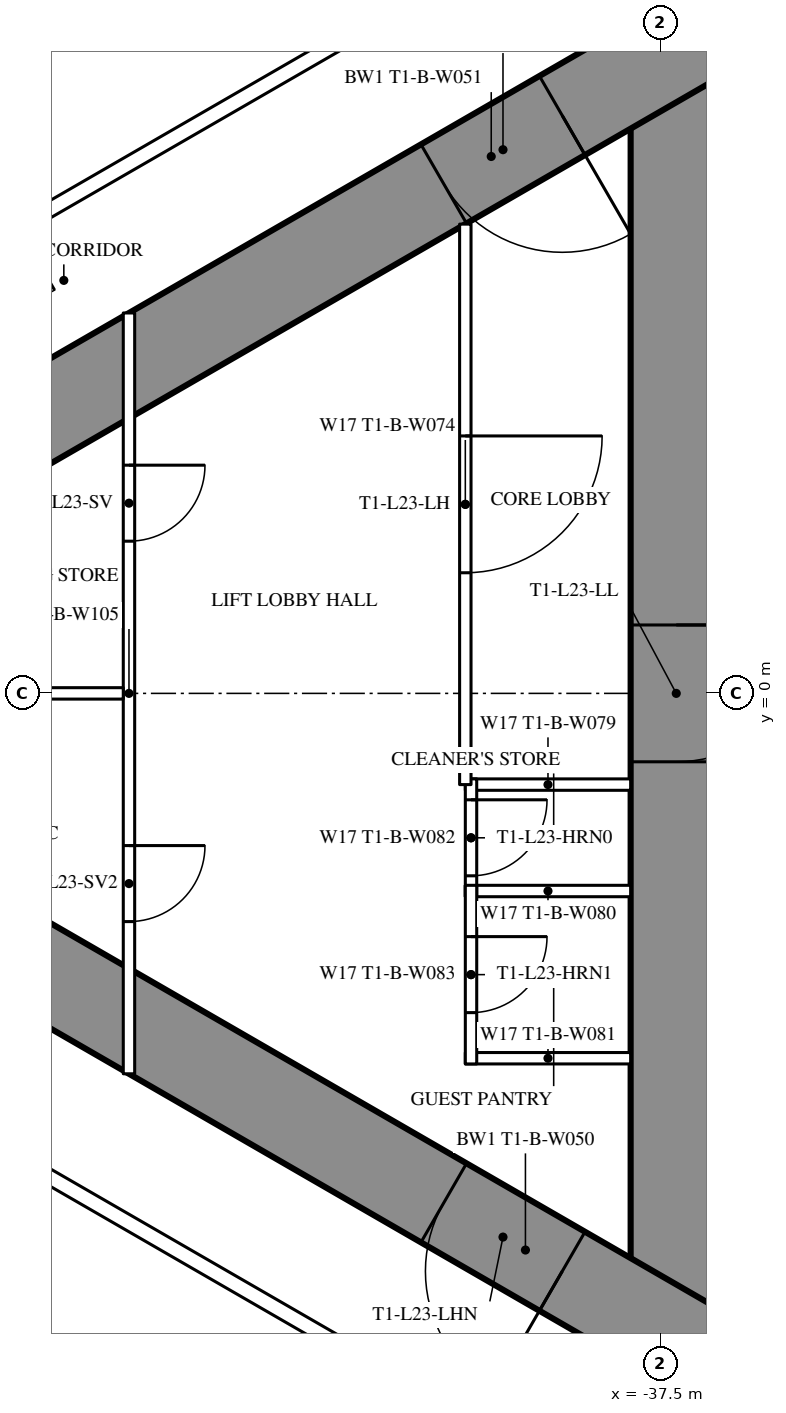
"""IFC4 building model, lengths in metres.
Left out: names, types, materials, properties, quantities, classifications, styles, units other than length and angle.
Written with IfcOpenShell. Run it as: python <this file> out.ifc"""

import sys

from ifc_helpers import new_model, si_unit, direction, frame, frame_2d, origin, place, context, subcontext, project, spatial, rectangle, extrude, element, fill, save


model = new_model("IFC4")
c1 = context("Model", 3, precision=1e-05, world=origin(), true_north=direction((0.0, 1.0)))
c2 = subcontext(c1, "Body", "Model", "MODEL_VIEW")
j1 = project(units=[si_unit("LENGTHUNIT", "METRE"), si_unit("PLANEANGLEUNIT", "RADIAN")], contexts=[c1])
p1 = place(None, origin())
s1 = spatial("IfcSite", under=j1, at=p1, CompositionType="ELEMENT")
p2 = place(p1, origin())
s2 = spatial("IfcBuilding", under=s1, at=p2, CompositionType="ELEMENT")
p3 = place(p2, frame((0.0, 0.0, 90.6)))
s3 = spatial("IfcBuildingStorey", under=s2, at=p3, CompositionType="ELEMENT", Elevation=90.6)
p4 = place(p3, frame((-37.3, 8.6, 0.0), z_axis=(0.0, 0.0, 1.0), x_axis=(0.0, -1.0, 0.0)))
e1 = element("IfcWall", 1, at=p4, inside=s3, PredefinedType="SHEAR", context=c2, shape_type="SweptSolid", body=[
    extrude(rectangle(XDim=17.2, YDim=1.2, at=frame_2d((8.6, 0.0))), origin(), (0.0, 0.0, 1.0), 3.5),
])
p5 = place(p4, frame((7.7, 0.0, 0.0)))
e2 = element("IfcOpeningElement", 2, at=p5, cuts=e1, PredefinedType="OPENING", context=c2, shape_type="SweptSolid", body=[
    extrude(rectangle(XDim=1.8, YDim=2.2, at=frame_2d((0.9, 1.1))), frame((0.0, 0.61, 0.0), z_axis=(0.0, -1.0, 0.0), x_axis=(1.0, 0.0, 0.0)), (0.0, 0.0, 1.0), 1.22),
])
p6 = place(p3, frame((-27.2, 14.3, 0.0), z_axis=(0.0, 0.0, 1.0), x_axis=(-0.866026593062, -0.499997940104, 0.0)))
e3 = element("IfcWall", 3, at=p6, inside=s3, PredefinedType="SHEAR", context=c2, shape_type="SweptSolid", body=[
    extrude(rectangle(XDim=28.946, YDim=1.2, at=frame_2d((14.473, 0.0))), origin(), (0.0, 0.0, 1.0), 3.5),
])
p7 = place(p6, frame((4.6, 0.0, 0.0)))
e4 = element("IfcOpeningElement", 4, at=p7, cuts=e3, PredefinedType="OPENING", context=c2, shape_type="SweptSolid", body=[
    extrude(rectangle(XDim=1.0, YDim=2.2, at=frame_2d((0.5, 1.1))), frame((0.0, 0.61, 0.0), z_axis=(0.0, -1.0, 0.0), x_axis=(1.0, 0.0, 0.0)), (0.0, 0.0, 1.0), 1.22),
])
p8 = place(p6, frame((13.395, 0.0, 0.0)))
e5 = element("IfcOpeningElement", 5, at=p8, cuts=e3, PredefinedType="OPENING", context=c2, shape_type="SweptSolid", body=[
    extrude(rectangle(XDim=1.8, YDim=2.2, at=frame_2d((0.9, 1.1))), frame((0.0, 0.61, 0.0), z_axis=(0.0, -1.0, 0.0), x_axis=(1.0, 0.0, 0.0)), (0.0, 0.0, 1.0), 1.22),
])
p9 = place(p3, frame((-27.2, -14.3, 0.0), z_axis=(0.0, 0.0, 1.0), x_axis=(-0.866024021859, 0.500002393557, 0.0)))
e6 = element("IfcWall", 6, at=p9, inside=s3, PredefinedType="SHEAR", context=c2, shape_type="SweptSolid", body=[
    extrude(rectangle(XDim=27.907, YDim=1.2, at=frame_2d((13.954, 0.0))), origin(), (0.0, 0.0, 1.0), 3.5),
])
p10 = place(p9, frame((4.6, 0.0, 0.0)))
e7 = element("IfcOpeningElement", 7, at=p10, cuts=e6, PredefinedType="OPENING", context=c2, shape_type="SweptSolid", body=[
    extrude(rectangle(XDim=1.0, YDim=2.2, at=frame_2d((0.5, 1.1))), frame((0.0, 0.61, 0.0), z_axis=(0.0, -1.0, 0.0), x_axis=(1.0, 0.0, 0.0)), (0.0, 0.0, 1.0), 1.22),
])
p11 = place(p9, frame((13.395, 0.0, 0.0)))
e8 = element("IfcOpeningElement", 8, at=p11, cuts=e6, PredefinedType="OPENING", context=c2, shape_type="SweptSolid", body=[
    extrude(rectangle(XDim=1.8, YDim=2.2, at=frame_2d((0.9, 1.1))), frame((0.0, 0.61, 0.0), z_axis=(0.0, -1.0, 0.0), x_axis=(1.0, 0.0, 0.0)), (0.0, 0.0, 1.0), 1.22),
])
p12 = place(p3, frame((-37.7, 10.894, 0.0), z_axis=(0.0, 0.0, 1.0), x_axis=(-0.866027905338, -0.499995667157, 0.0)))
e9 = element("IfcWall", 9, at=p12, inside=s3, PredefinedType="PARTITIONING", context=c2, shape_type="SweptSolid", body=[
    extrude(rectangle(XDim=21.787, YDim=0.2, at=frame_2d((10.894, 0.0))), origin(), (0.0, 0.0, 1.0), 3.25),
])
p13 = place(p12, frame((17.887, 0.0, 0.0)))
e10 = element("IfcOpeningElement", 10, at=p13, cuts=e9, PredefinedType="OPENING", context=c2, shape_type="SweptSolid", body=[
    extrude(rectangle(XDim=0.95, YDim=2.2, at=frame_2d((0.475, 1.1))), frame((0.0, 0.11, 0.0), z_axis=(0.0, -1.0, 0.0), x_axis=(1.0, 0.0, 0.0)), (0.0, 0.0, 1.0), 0.22),
])
p14 = place(p12, frame((9.531, 0.0, 0.0)))
e11 = element("IfcOpeningElement", 11, at=p14, cuts=e9, PredefinedType="OPENING", context=c2, shape_type="SweptSolid", body=[
    extrude(rectangle(XDim=0.95, YDim=2.2, at=frame_2d((0.475, 1.1))), frame((0.0, 0.11, 0.0), z_axis=(0.0, -1.0, 0.0), x_axis=(1.0, 0.0, 0.0)), (0.0, 0.0, 1.0), 0.22),
])
p15 = place(p3, frame((-36.92, -11.344, 0.0), z_axis=(0.0, 0.0, 1.0), x_axis=(-0.866028313256, 0.499994960614, 0.0)))
e12 = element("IfcWall", 12, at=p15, inside=s3, PredefinedType="PARTITIONING", context=c2, shape_type="SweptSolid", body=[
    extrude(rectangle(XDim=22.568, YDim=0.2, at=frame_2d((11.284, 0.0))), origin(), (0.0, 0.0, 1.0), 3.25),
])
p16 = place(p15, frame((14.481, 0.0, 0.0)))
e13 = element("IfcOpeningElement", 13, at=p16, cuts=e12, PredefinedType="OPENING", context=c2, shape_type="SweptSolid", body=[
    extrude(rectangle(XDim=0.95, YDim=2.2, at=frame_2d((0.475, 1.1))), frame((0.0, 0.11, 0.0), z_axis=(0.0, -1.0, 0.0), x_axis=(1.0, 0.0, 0.0)), (0.0, 0.0, 1.0), 0.22),
])
p17 = place(p15, frame((3.35, 0.0, 0.0)))
e14 = element("IfcOpeningElement", 14, at=p17, cuts=e12, PredefinedType="OPENING", context=c2, shape_type="SweptSolid", body=[
    extrude(rectangle(XDim=1.0, YDim=2.2, at=frame_2d((0.5, 1.1))), frame((0.0, 0.11, 0.0), z_axis=(0.0, -1.0, 0.0), x_axis=(1.0, 0.0, 0.0)), (0.0, 0.0, 1.0), 0.22),
])
for number, where, z_axis, x_axis in (
    (15, (-37.9, -1.2, 0.0), (0.0, 0.0, 1.0), (-1.0, 0.0, 0.0)),
    (16, (-37.9, -2.6, 0.0), (0.0, 0.0, 1.0), (-1.0, 0.0, 0.0)),
    (17, (-37.9, -4.8, 0.0), (0.0, 0.0, 1.0), (-1.0, 0.0, 0.0)),
):
    element("IfcWall", number, at=place(p3, frame(where, z_axis=z_axis, x_axis=x_axis)), inside=s3, PredefinedType="PARTITIONING", context=c2, shape_type="SweptSolid", body=[
        extrude(rectangle(XDim=2.175, YDim=0.15, at=frame_2d((1.087, 0.0))), origin(), (0.0, 0.0, 1.0), 3.25),
    ])
p18 = place(p3, frame((-40.0, -1.125, 0.0), z_axis=(0.0, 0.0, 1.0), x_axis=(0.0, -1.0, 0.0)))
e18 = element("IfcWall", 18, at=p18, inside=s3, PredefinedType="PARTITIONING", context=c2, shape_type="SweptSolid", body=[
    extrude(rectangle(XDim=1.55, YDim=0.15, at=frame_2d((0.775, 0.0))), origin(), (0.0, 0.0, 1.0), 3.25),
])
p19 = place(p18, frame((0.275, 0.0, 0.0)))
e19 = element("IfcOpeningElement", 19, at=p19, cuts=e18, PredefinedType="OPENING", context=c2, shape_type="SweptSolid", body=[
    extrude(rectangle(XDim=1.0, YDim=2.2, at=frame_2d((0.5, 1.1))), frame((0.0, 0.085, 0.0), z_axis=(0.0, -1.0, 0.0), x_axis=(1.0, 0.0, 0.0)), (0.0, 0.0, 1.0), 0.17),
])
p20 = place(p3, frame((-40.0, -2.525, 0.0), z_axis=(0.0, 0.0, 1.0), x_axis=(0.0, -1.0, 0.0)))
e20 = element("IfcWall", 20, at=p20, inside=s3, PredefinedType="PARTITIONING", context=c2, shape_type="SweptSolid", body=[
    extrude(rectangle(XDim=2.35, YDim=0.15, at=frame_2d((1.175, 0.0))), origin(), (0.0, 0.0, 1.0), 3.25),
])
p21 = place(p20, frame((0.675, 0.0, 0.0)))
e21 = element("IfcOpeningElement", 21, at=p21, cuts=e20, PredefinedType="OPENING", context=c2, shape_type="SweptSolid", body=[
    extrude(rectangle(XDim=1.0, YDim=2.2, at=frame_2d((0.5, 1.1))), frame((0.0, 0.085, 0.0), z_axis=(0.0, -1.0, 0.0), x_axis=(1.0, 0.0, 0.0)), (0.0, 0.0, 1.0), 0.17),
])
p22 = place(p3, frame((-40.075, 6.174, 0.0), z_axis=(0.0, 0.0, 1.0), x_axis=(0.0, -1.0, 0.0)))
e22 = element("IfcWall", 22, at=p22, inside=s3, PredefinedType="PARTITIONING", context=c2, shape_type="SweptSolid", body=[
    extrude(rectangle(XDim=7.374, YDim=0.15, at=frame_2d((3.687, 0.0))), origin(), (0.0, 0.0, 1.0), 3.25),
])
p23 = place(p22, frame((2.787, 0.0, 0.0)))
e23 = element("IfcOpeningElement", 23, at=p23, cuts=e22, PredefinedType="OPENING", context=c2, shape_type="SweptSolid", body=[
    extrude(rectangle(XDim=1.8, YDim=2.2, at=frame_2d((0.9, 1.1))), frame((0.0, 0.085, 0.0), z_axis=(0.0, -1.0, 0.0), x_axis=(1.0, 0.0, 0.0)), (0.0, 0.0, 1.0), 0.17),
])
p24 = place(p3, frame((-44.5, 5.005, 0.0), z_axis=(0.0, 0.0, 1.0), x_axis=(0.0, -1.0, 0.0)))
e24 = element("IfcWall", 24, at=p24, inside=s3, PredefinedType="PARTITIONING", context=c2, shape_type="SweptSolid", body=[
    extrude(rectangle(XDim=10.009, YDim=0.15, at=frame_2d((5.005, 0.0))), origin(), (0.0, 0.0, 1.0), 2.45),
])
p25 = place(p24, frame((2.002, 0.0, 0.0)))
e25 = element("IfcOpeningElement", 25, at=p25, cuts=e24, PredefinedType="OPENING", context=c2, shape_type="SweptSolid", body=[
    extrude(rectangle(XDim=1.0, YDim=2.2, at=frame_2d((0.5, 1.1))), frame((0.0, 0.085, 0.0), z_axis=(0.0, -1.0, 0.0), x_axis=(1.0, 0.0, 0.0)), (0.0, 0.0, 1.0), 0.17),
])
p26 = place(p24, frame((7.007, 0.0, 0.0)))
e26 = element("IfcOpeningElement", 26, at=p26, cuts=e24, PredefinedType="OPENING", context=c2, shape_type="SweptSolid", body=[
    extrude(rectangle(XDim=1.0, YDim=2.2, at=frame_2d((0.5, 1.1))), frame((0.0, 0.085, 0.0), z_axis=(0.0, -1.0, 0.0), x_axis=(1.0, 0.0, 0.0)), (0.0, 0.0, 1.0), 0.17),
])
p27 = place(p3, frame((-44.575, 0.0, 0.0), z_axis=(0.0, 0.0, 1.0), x_axis=(-1.0, 0.0, 0.0)))
e27 = element("IfcWall", 27, at=p27, inside=s3, PredefinedType="PARTITIONING", context=c2, shape_type="SweptSolid", body=[
    extrude(rectangle(XDim=8.593, YDim=0.15, at=frame_2d((4.297, 0.0))), origin(), (0.0, 0.0, 1.0), 2.2),
])
p28 = place(p19, origin())
e28 = element("IfcDoor", 28, at=p28, inside=s3, OperationType="SINGLE_SWING_LEFT", PredefinedType="DOOR", context=c2, shape_type="SweptSolid", body=[
    extrude(rectangle(XDim=1.0, YDim=2.2, at=frame_2d((0.5, 1.1))), frame((0.0, 0.025, 0.0), z_axis=(0.0, -1.0, 0.0), x_axis=(1.0, 0.0, 0.0)), (0.0, 0.0, 1.0), 0.05),
])
fill(e19, e28)
p29 = place(p21, origin())
e29 = element("IfcDoor", 29, at=p29, inside=s3, OperationType="SINGLE_SWING_LEFT", PredefinedType="DOOR", context=c2, shape_type="SweptSolid", body=[
    extrude(rectangle(XDim=1.0, YDim=2.2, at=frame_2d((0.5, 1.1))), frame((0.0, 0.025, 0.0), z_axis=(0.0, -1.0, 0.0), x_axis=(1.0, 0.0, 0.0)), (0.0, 0.0, 1.0), 0.05),
])
fill(e21, e29)
p30 = place(p23, origin())
e30 = element("IfcDoor", 30, at=p30, inside=s3, OperationType="DOUBLE_DOOR_SINGLE_SWING", PredefinedType="DOOR", context=c2, shape_type="SweptSolid", body=[
    extrude(rectangle(XDim=1.8, YDim=2.2, at=frame_2d((0.9, 1.1))), frame((0.0, 0.025, 0.0), z_axis=(0.0, -1.0, 0.0), x_axis=(1.0, 0.0, 0.0)), (0.0, 0.0, 1.0), 0.05),
])
fill(e23, e30)
p31 = place(p25, origin())
e31 = element("IfcDoor", 31, at=p31, inside=s3, OperationType="SINGLE_SWING_LEFT", PredefinedType="DOOR", context=c2, shape_type="SweptSolid", body=[
    extrude(rectangle(XDim=1.0, YDim=2.2, at=frame_2d((0.5, 1.1))), frame((0.0, 0.025, 0.0), z_axis=(0.0, -1.0, 0.0), x_axis=(1.0, 0.0, 0.0)), (0.0, 0.0, 1.0), 0.05),
])
fill(e25, e31)
p32 = place(p26, origin())
e32 = element("IfcDoor", 32, at=p32, inside=s3, OperationType="SINGLE_SWING_LEFT", PredefinedType="DOOR", context=c2, shape_type="SweptSolid", body=[
    extrude(rectangle(XDim=1.0, YDim=2.2, at=frame_2d((0.5, 1.1))), frame((0.0, 0.025, 0.0), z_axis=(0.0, -1.0, 0.0), x_axis=(1.0, 0.0, 0.0)), (0.0, 0.0, 1.0), 0.05),
])
fill(e26, e32)
p33 = place(p8, origin())
e33 = element("IfcDoor", 33, at=p33, inside=s3, OperationType="DOUBLE_DOOR_SINGLE_SWING", PredefinedType="DOOR", context=c2, shape_type="SweptSolid", body=[
    extrude(rectangle(XDim=1.8, YDim=2.2, at=frame_2d((0.9, 1.1))), frame((0.0, 0.025, 0.0), z_axis=(0.0, -1.0, 0.0), x_axis=(1.0, 0.0, 0.0)), (0.0, 0.0, 1.0), 0.05),
])
fill(e5, e33)
p34 = place(p11, origin())
e34 = element("IfcDoor", 34, at=p34, inside=s3, OperationType="DOUBLE_DOOR_SINGLE_SWING", PredefinedType="DOOR", context=c2, shape_type="SweptSolid", body=[
    extrude(rectangle(XDim=1.8, YDim=2.2, at=frame_2d((0.9, 1.1))), frame((0.0, 0.025, 0.0), z_axis=(0.0, -1.0, 0.0), x_axis=(1.0, 0.0, 0.0)), (0.0, 0.0, 1.0), 0.05),
])
fill(e8, e34)
p35 = place(p5, origin())
e35 = element("IfcDoor", 35, at=p35, inside=s3, OperationType="DOUBLE_DOOR_SINGLE_SWING", PredefinedType="DOOR", context=c2, shape_type="SweptSolid", body=[
    extrude(rectangle(XDim=1.8, YDim=2.2, at=frame_2d((0.9, 1.1))), frame((0.0, 0.025, 0.0), z_axis=(0.0, -1.0, 0.0), x_axis=(1.0, 0.0, 0.0)), (0.0, 0.0, 1.0), 0.05),
])
fill(e2, e35)
save(model, sys.argv[1])
